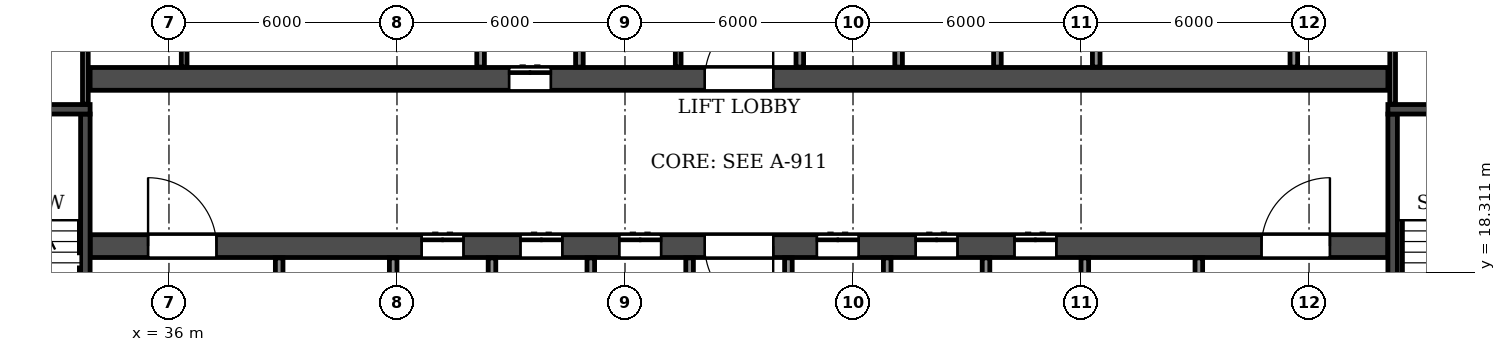
"""IFC4 building model, lengths in metres.
Left out: names, types, materials, properties, quantities, classifications, styles, units other than length and angle.
Written with IfcOpenShell. Run it as: python <this file> out.ifc"""

import sys

from ifc_helpers import new_model, si_unit, direction, frame, frame_2d, origin, place, context, subcontext, project, spatial, rectangle, extrude, element, fill, save


model = new_model("IFC4")
c1 = context("Model", 3, precision=1e-05, world=origin(), true_north=direction((0.0, 1.0)))
c2 = subcontext(c1, "Body", "Model", "MODEL_VIEW")
j1 = project(units=[si_unit("LENGTHUNIT", "METRE"), si_unit("PLANEANGLEUNIT", "RADIAN")], contexts=[c1])
p1 = place(None, origin())
s1 = spatial("IfcSite", under=j1, at=p1, CompositionType="ELEMENT")
p2 = place(p1, origin())
s2 = spatial("IfcBuilding", under=s1, at=p2, CompositionType="ELEMENT")
p3 = place(p2, frame((0.0, 0.0, 53.1)))
s3 = spatial("IfcBuildingStorey", under=s2, at=p3, CompositionType="ELEMENT", Elevation=53.1)
p4 = place(p3, frame((33.925, 19.0, 0.0), z_axis=(0.0, 0.0, 1.0), x_axis=(1.0, 0.0, 0.0)))
e1 = element("IfcWall", 1, at=p4, inside=s3, PredefinedType="SOLIDWALL", context=c2, shape_type="SweptSolid", body=[
    extrude(rectangle(XDim=34.15, YDim=0.6, at=frame_2d((17.075, 0.0))), origin(), (0.0, 0.0, 1.0), 3.05),
])
p5 = place(p4, frame((16.175, 0.0, 0.0)))
e2 = element("IfcOpeningElement", 2, at=p5, cuts=e1, PredefinedType="OPENING", context=c2, shape_type="SweptSolid", body=[
    extrude(rectangle(XDim=1.8, YDim=2.1, at=frame_2d((0.9, 1.05))), frame((0.0, 0.31, 0.0), z_axis=(0.0, -1.0, 0.0), x_axis=(1.0, 0.0, 0.0)), (0.0, 0.0, 1.0), 0.62),
])
p6 = place(p4, frame((1.525, 0.0, 0.0)))
e3 = element("IfcOpeningElement", 3, at=p6, cuts=e1, PredefinedType="OPENING", context=c2, shape_type="SweptSolid", body=[
    extrude(rectangle(XDim=1.8, YDim=2.1, at=frame_2d((0.9, 1.05))), frame((0.0, 0.31, 0.0), z_axis=(0.0, -1.0, 0.0), x_axis=(1.0, 0.0, 0.0)), (0.0, 0.0, 1.0), 0.62),
])
p7 = place(p4, frame((8.725, 0.0, 0.0)))
e4 = element("IfcOpeningElement", 4, at=p7, cuts=e1, PredefinedType="OPENING", context=c2, shape_type="SweptSolid", body=[
    extrude(rectangle(XDim=1.1, YDim=2.1, at=frame_2d((0.55, 1.05))), frame((0.0, 0.31, 0.0), z_axis=(0.0, -1.0, 0.0), x_axis=(1.0, 0.0, 0.0)), (0.0, 0.0, 1.0), 0.62),
])
p8 = place(p4, frame((11.325, 0.0, 0.0)))
e5 = element("IfcOpeningElement", 5, at=p8, cuts=e1, PredefinedType="OPENING", context=c2, shape_type="SweptSolid", body=[
    extrude(rectangle(XDim=1.1, YDim=2.1, at=frame_2d((0.55, 1.05))), frame((0.0, 0.31, 0.0), z_axis=(0.0, -1.0, 0.0), x_axis=(1.0, 0.0, 0.0)), (0.0, 0.0, 1.0), 0.62),
])
p9 = place(p4, frame((13.925, 0.0, 0.0)))
e6 = element("IfcOpeningElement", 6, at=p9, cuts=e1, PredefinedType="OPENING", context=c2, shape_type="SweptSolid", body=[
    extrude(rectangle(XDim=1.1, YDim=2.1, at=frame_2d((0.55, 1.05))), frame((0.0, 0.31, 0.0), z_axis=(0.0, -1.0, 0.0), x_axis=(1.0, 0.0, 0.0)), (0.0, 0.0, 1.0), 0.62),
])
p10 = place(p4, frame((19.125, 0.0, 0.0)))
e7 = element("IfcOpeningElement", 7, at=p10, cuts=e1, PredefinedType="OPENING", context=c2, shape_type="SweptSolid", body=[
    extrude(rectangle(XDim=1.1, YDim=2.1, at=frame_2d((0.55, 1.05))), frame((0.0, 0.31, 0.0), z_axis=(0.0, -1.0, 0.0), x_axis=(1.0, 0.0, 0.0)), (0.0, 0.0, 1.0), 0.62),
])
p11 = place(p4, frame((21.725, 0.0, 0.0)))
e8 = element("IfcOpeningElement", 8, at=p11, cuts=e1, PredefinedType="OPENING", context=c2, shape_type="SweptSolid", body=[
    extrude(rectangle(XDim=1.1, YDim=2.1, at=frame_2d((0.55, 1.05))), frame((0.0, 0.31, 0.0), z_axis=(0.0, -1.0, 0.0), x_axis=(1.0, 0.0, 0.0)), (0.0, 0.0, 1.0), 0.62),
])
p12 = place(p4, frame((24.325, 0.0, 0.0)))
e9 = element("IfcOpeningElement", 9, at=p12, cuts=e1, PredefinedType="OPENING", context=c2, shape_type="SweptSolid", body=[
    extrude(rectangle(XDim=1.1, YDim=2.1, at=frame_2d((0.55, 1.05))), frame((0.0, 0.31, 0.0), z_axis=(0.0, -1.0, 0.0), x_axis=(1.0, 0.0, 0.0)), (0.0, 0.0, 1.0), 0.62),
])
p13 = place(p4, frame((30.825, 0.0, 0.0)))
e10 = element("IfcOpeningElement", 10, at=p13, cuts=e1, PredefinedType="OPENING", context=c2, shape_type="SweptSolid", body=[
    extrude(rectangle(XDim=1.8, YDim=2.1, at=frame_2d((0.9, 1.05))), frame((0.0, 0.31, 0.0), z_axis=(0.0, -1.0, 0.0), x_axis=(1.0, 0.0, 0.0)), (0.0, 0.0, 1.0), 0.62),
])
p14 = place(p3, frame((33.925, 23.4, 0.0), z_axis=(0.0, 0.0, 1.0), x_axis=(1.0, 0.0, 0.0)))
e11 = element("IfcWall", 11, at=p14, inside=s3, PredefinedType="SOLIDWALL", context=c2, shape_type="SweptSolid", body=[
    extrude(rectangle(XDim=34.15, YDim=0.6, at=frame_2d((17.075, 0.0))), origin(), (0.0, 0.0, 1.0), 3.05),
])
p15 = place(p14, frame((16.175, 0.0, 0.0)))
e12 = element("IfcOpeningElement", 12, at=p15, cuts=e11, PredefinedType="OPENING", context=c2, shape_type="SweptSolid", body=[
    extrude(rectangle(XDim=1.8, YDim=2.1, at=frame_2d((0.9, 1.05))), frame((0.0, 0.31, 0.0), z_axis=(0.0, -1.0, 0.0), x_axis=(1.0, 0.0, 0.0)), (0.0, 0.0, 1.0), 0.62),
])
p16 = place(p14, frame((11.025, 0.0, 0.0)))
e13 = element("IfcOpeningElement", 13, at=p16, cuts=e11, PredefinedType="OPENING", context=c2, shape_type="SweptSolid", body=[
    extrude(rectangle(XDim=1.1, YDim=2.1, at=frame_2d((0.55, 1.05))), frame((0.0, 0.31, 0.0), z_axis=(0.0, -1.0, 0.0), x_axis=(1.0, 0.0, 0.0)), (0.0, 0.0, 1.0), 0.62),
])
p17 = place(p3, frame((33.8, 14.9, 0.0), z_axis=(0.0, 0.0, 1.0), x_axis=(0.0, 1.0, 0.0)))
e14 = element("IfcWall", 14, at=p17, inside=s3, PredefinedType="SOLIDWALL", context=c2, shape_type="SweptSolid", body=[
    extrude(rectangle(XDim=7.575, YDim=0.25, at=frame_2d((3.788, 0.0))), origin(), (0.0, 0.0, 1.0), 3.05),
])
p18 = place(p17, frame((0.4, 0.0, 0.0)))
e15 = element("IfcOpeningElement", 15, at=p18, cuts=e14, PredefinedType="OPENING", context=c2, shape_type="SweptSolid", body=[
    extrude(rectangle(XDim=1.0, YDim=2.1, at=frame_2d((0.5, 1.05))), frame((0.0, 0.135, 0.0), z_axis=(0.0, -1.0, 0.0), x_axis=(1.0, 0.0, 0.0)), (0.0, 0.0, 1.0), 0.27),
])
p19 = place(p3, frame((29.875, 22.6, 0.0), z_axis=(0.0, 0.0, 1.0), x_axis=(1.0, 0.0, 0.0)))
e16 = element("IfcWall", 16, at=p19, inside=s3, PredefinedType="SOLIDWALL", context=c2, shape_type="SweptSolid", body=[
    extrude(rectangle(XDim=4.05, YDim=0.25, at=frame_2d((2.025, 0.0))), origin(), (0.0, 0.0, 1.0), 3.05),
])
p20 = place(p3, frame((68.2, 14.9, 0.0), z_axis=(0.0, 0.0, 1.0), x_axis=(0.0, 1.0, 0.0)))
e17 = element("IfcWall", 17, at=p20, inside=s3, PredefinedType="SOLIDWALL", context=c2, shape_type="SweptSolid", body=[
    extrude(rectangle(XDim=7.575, YDim=0.25, at=frame_2d((3.788, 0.0))), origin(), (0.0, 0.0, 1.0), 3.05),
])
p21 = place(p20, frame((0.4, 0.0, 0.0)))
e18 = element("IfcOpeningElement", 18, at=p21, cuts=e17, PredefinedType="OPENING", context=c2, shape_type="SweptSolid", body=[
    extrude(rectangle(XDim=1.0, YDim=2.1, at=frame_2d((0.5, 1.05))), frame((0.0, 0.135, 0.0), z_axis=(0.0, -1.0, 0.0), x_axis=(1.0, 0.0, 0.0)), (0.0, 0.0, 1.0), 0.27),
])
p22 = place(p3, frame((68.075, 22.6, 0.0), z_axis=(0.0, 0.0, 1.0), x_axis=(1.0, 0.0, 0.0)))
e19 = element("IfcWall", 19, at=p22, inside=s3, PredefinedType="SOLIDWALL", context=c2, shape_type="SweptSolid", body=[
    extrude(rectangle(XDim=4.05, YDim=0.25, at=frame_2d((2.025, 0.0))), origin(), (0.0, 0.0, 1.0), 3.05),
])
for number, where, z_axis, x_axis in (
    (20, (49.4, 23.71, 0.0), (0.0, 0.0, 1.0), (0.0, 1.0, 0.0)),
    (21, (36.4, 23.71, 0.0), (0.0, 0.0, 1.0), (0.0, 1.0, 0.0)),
):
    element("IfcWall", number, at=place(p3, frame(where, z_axis=z_axis, x_axis=x_axis)), inside=s3, PredefinedType="PARTITIONING", context=c2, shape_type="SweptSolid", body=[
        extrude(rectangle(XDim=3.78, YDim=0.15, at=frame_2d((1.89, 0.0))), origin(), (0.0, 0.0, 1.0), 3.05),
    ])
p23 = place(p3, frame((65.6, 23.71, 0.0), z_axis=(0.0, 0.0, 1.0), x_axis=(0.0, 1.0, 0.0)))
e22 = element("IfcWall", 22, at=p23, inside=s3, PredefinedType="PARTITIONING", context=c2, shape_type="SweptSolid", body=[
    extrude(rectangle(XDim=3.78, YDim=0.2, at=frame_2d((1.89, 0.0))), origin(), (0.0, 0.0, 1.0), 3.05),
])
for number, where, z_axis, x_axis in (
    (23, (33.8, 22.735, 0.0), (0.0, 0.0, 1.0), (0.0, 1.0, 0.0)),
    (24, (68.2, 22.735, 0.0), (0.0, 0.0, 1.0), (0.0, 1.0, 0.0)),
):
    element("IfcWall", number, at=place(p3, frame(where, z_axis=z_axis, x_axis=x_axis)), inside=s3, PredefinedType="PARTITIONING", context=c2, shape_type="SweptSolid", body=[
        extrude(rectangle(XDim=4.755, YDim=0.15, at=frame_2d((2.377, 0.0))), origin(), (0.0, 0.0, 1.0), 3.05),
    ])
p24 = place(p3, frame((38.9, 14.91, 0.0), z_axis=(0.0, 0.0, 1.0), x_axis=(0.0, 1.0, 0.0)))
e25 = element("IfcWall", 25, at=p24, inside=s3, PredefinedType="PARTITIONING", context=c2, shape_type="SweptSolid", body=[
    extrude(rectangle(XDim=3.78, YDim=0.2, at=frame_2d((1.89, 0.0))), origin(), (0.0, 0.0, 1.0), 3.05),
])
p25 = place(p24, frame((1.34, 0.0, 0.0)))
e26 = element("IfcOpeningElement", 26, at=p25, cuts=e25, PredefinedType="OPENING", context=c2, shape_type="SweptSolid", body=[
    extrude(rectangle(XDim=1.1, YDim=2.1, at=frame_2d((0.55, 1.05))), frame((0.0, 0.11, 0.0), z_axis=(0.0, -1.0, 0.0), x_axis=(1.0, 0.0, 0.0)), (0.0, 0.0, 1.0), 0.22),
])
for number, where, z_axis, x_axis in (
    (27, (41.9, 14.91, 0.0), (0.0, 0.0, 1.0), (0.0, 1.0, 0.0)),
    (28, (44.2, 23.71, 0.0), (0.0, 0.0, 1.0), (0.0, 1.0, 0.0)),
):
    element("IfcWall", number, at=place(p3, frame(where, z_axis=z_axis, x_axis=x_axis)), inside=s3, PredefinedType="PARTITIONING", context=c2, shape_type="SweptSolid", body=[
        extrude(rectangle(XDim=3.78, YDim=0.2, at=frame_2d((1.89, 0.0))), origin(), (0.0, 0.0, 1.0), 3.05),
    ])
p26 = place(p3, frame((44.5, 16.3, 0.0), z_axis=(0.0, 0.0, 1.0), x_axis=(0.0, 1.0, 0.0)))
e29 = element("IfcWall", 29, at=p26, inside=s3, PredefinedType="PARTITIONING", context=c2, shape_type="SweptSolid", body=[
    extrude(rectangle(XDim=2.39, YDim=0.2, at=frame_2d((1.195, 0.0))), origin(), (0.0, 0.0, 1.0), 3.05),
])
p27 = place(p3, frame((46.8, 23.71, 0.0), z_axis=(0.0, 0.0, 1.0), x_axis=(0.0, 1.0, 0.0)))
e30 = element("IfcWall", 30, at=p27, inside=s3, PredefinedType="PARTITIONING", context=c2, shape_type="SweptSolid", body=[
    extrude(rectangle(XDim=3.78, YDim=0.2, at=frame_2d((1.89, 0.0))), origin(), (0.0, 0.0, 1.0), 3.05),
])
for number, where, z_axis, x_axis in (
    (31, (47.1, 16.3, 0.0), (0.0, 0.0, 1.0), (0.0, 1.0, 0.0)),
    (32, (49.7, 16.3, 0.0), (0.0, 0.0, 1.0), (0.0, 1.0, 0.0)),
    (33, (52.3, 16.3, 0.0), (0.0, 0.0, 1.0), (0.0, 1.0, 0.0)),
):
    element("IfcWall", number, at=place(p3, frame(where, z_axis=z_axis, x_axis=x_axis)), inside=s3, PredefinedType="PARTITIONING", context=c2, shape_type="SweptSolid", body=[
        extrude(rectangle(XDim=2.39, YDim=0.2, at=frame_2d((1.195, 0.0))), origin(), (0.0, 0.0, 1.0), 3.05),
    ])
p28 = place(p3, frame((52.6, 23.71, 0.0), z_axis=(0.0, 0.0, 1.0), x_axis=(0.0, 1.0, 0.0)))
e34 = element("IfcWall", 34, at=p28, inside=s3, PredefinedType="PARTITIONING", context=c2, shape_type="SweptSolid", body=[
    extrude(rectangle(XDim=2.39, YDim=0.2, at=frame_2d((1.195, 0.0))), origin(), (0.0, 0.0, 1.0), 3.05),
])
p29 = place(p3, frame((54.9, 16.3, 0.0), z_axis=(0.0, 0.0, 1.0), x_axis=(0.0, 1.0, 0.0)))
e35 = element("IfcWall", 35, at=p29, inside=s3, PredefinedType="PARTITIONING", context=c2, shape_type="SweptSolid", body=[
    extrude(rectangle(XDim=2.39, YDim=0.2, at=frame_2d((1.195, 0.0))), origin(), (0.0, 0.0, 1.0), 3.05),
])
p30 = place(p3, frame((55.2, 23.71, 0.0), z_axis=(0.0, 0.0, 1.0), x_axis=(0.0, 1.0, 0.0)))
e36 = element("IfcWall", 36, at=p30, inside=s3, PredefinedType="PARTITIONING", context=c2, shape_type="SweptSolid", body=[
    extrude(rectangle(XDim=2.39, YDim=0.2, at=frame_2d((1.195, 0.0))), origin(), (0.0, 0.0, 1.0), 3.05),
])
p31 = place(p3, frame((57.5, 16.3, 0.0), z_axis=(0.0, 0.0, 1.0), x_axis=(0.0, 1.0, 0.0)))
e37 = element("IfcWall", 37, at=p31, inside=s3, PredefinedType="PARTITIONING", context=c2, shape_type="SweptSolid", body=[
    extrude(rectangle(XDim=2.39, YDim=0.2, at=frame_2d((1.195, 0.0))), origin(), (0.0, 0.0, 1.0), 3.05),
])
p32 = place(p3, frame((57.8, 23.71, 0.0), z_axis=(0.0, 0.0, 1.0), x_axis=(0.0, 1.0, 0.0)))
e38 = element("IfcWall", 38, at=p32, inside=s3, PredefinedType="PARTITIONING", context=c2, shape_type="SweptSolid", body=[
    extrude(rectangle(XDim=2.39, YDim=0.2, at=frame_2d((1.195, 0.0))), origin(), (0.0, 0.0, 1.0), 3.05),
])
p33 = place(p3, frame((60.1, 14.91, 0.0), z_axis=(0.0, 0.0, 1.0), x_axis=(0.0, 1.0, 0.0)))
e39 = element("IfcWall", 39, at=p33, inside=s3, PredefinedType="PARTITIONING", context=c2, shape_type="SweptSolid", body=[
    extrude(rectangle(XDim=3.78, YDim=0.2, at=frame_2d((1.89, 0.0))), origin(), (0.0, 0.0, 1.0), 3.05),
])
p34 = place(p3, frame((60.4, 23.71, 0.0), z_axis=(0.0, 0.0, 1.0), x_axis=(0.0, 1.0, 0.0)))
e40 = element("IfcWall", 40, at=p34, inside=s3, PredefinedType="PARTITIONING", context=c2, shape_type="SweptSolid", body=[
    extrude(rectangle(XDim=2.39, YDim=0.2, at=frame_2d((1.195, 0.0))), origin(), (0.0, 0.0, 1.0), 3.05),
])
p35 = place(p3, frame((63.1, 14.91, 0.0), z_axis=(0.0, 0.0, 1.0), x_axis=(0.0, 1.0, 0.0)))
e41 = element("IfcWall", 41, at=p35, inside=s3, PredefinedType="PARTITIONING", context=c2, shape_type="SweptSolid", body=[
    extrude(rectangle(XDim=3.78, YDim=0.2, at=frame_2d((1.89, 0.0))), origin(), (0.0, 0.0, 1.0), 3.05),
])
p36 = place(p35, frame((1.34, 0.0, 0.0)))
e42 = element("IfcOpeningElement", 42, at=p36, cuts=e41, PredefinedType="OPENING", context=c2, shape_type="SweptSolid", body=[
    extrude(rectangle(XDim=1.1, YDim=2.1, at=frame_2d((0.55, 1.05))), frame((0.0, 0.11, 0.0), z_axis=(0.0, -1.0, 0.0), x_axis=(1.0, 0.0, 0.0)), (0.0, 0.0, 1.0), 0.22),
])
p37 = place(p15, origin())
e43 = element("IfcDoor", 43, at=p37, inside=s3, OperationType="DOUBLE_DOOR_SINGLE_SWING", PredefinedType="DOOR", context=c2, shape_type="SweptSolid", body=[
    extrude(rectangle(XDim=1.8, YDim=2.1, at=frame_2d((0.9, 1.05))), frame((0.0, 0.025, 0.0), z_axis=(0.0, -1.0, 0.0), x_axis=(1.0, 0.0, 0.0)), (0.0, 0.0, 1.0), 0.05),
])
fill(e12, e43)
p38 = place(p5, frame((1.8, 0.0, 0.0), z_axis=(0.0, 0.0, 1.0), x_axis=(-1.0, 0.0, 0.0)))
e44 = element("IfcDoor", 44, at=p38, inside=s3, OperationType="DOUBLE_DOOR_SINGLE_SWING", PredefinedType="DOOR", context=c2, shape_type="SweptSolid", body=[
    extrude(rectangle(XDim=1.8, YDim=2.1, at=frame_2d((0.9, 1.05))), frame((0.0, 0.025, 0.0), z_axis=(0.0, -1.0, 0.0), x_axis=(1.0, 0.0, 0.0)), (0.0, 0.0, 1.0), 0.05),
])
fill(e2, e44)
p39 = place(p6, origin())
e45 = element("IfcDoor", 45, at=p39, inside=s3, OperationType="DOUBLE_DOOR_SINGLE_SWING", PredefinedType="DOOR", context=c2, shape_type="SweptSolid", body=[
    extrude(rectangle(XDim=1.8, YDim=2.1, at=frame_2d((0.9, 1.05))), frame((0.0, 0.025, 0.0), z_axis=(0.0, -1.0, 0.0), x_axis=(1.0, 0.0, 0.0)), (0.0, 0.0, 1.0), 0.05),
])
fill(e3, e45)
p40 = place(p7, origin())
e46 = element("IfcDoor", 46, at=p40, inside=s3, OperationType="DOUBLE_DOOR_SLIDING", PredefinedType="DOOR", context=c2, shape_type="SweptSolid", body=[
    extrude(rectangle(XDim=1.1, YDim=2.1, at=frame_2d((0.55, 1.05))), frame((0.0, 0.025, 0.0), z_axis=(0.0, -1.0, 0.0), x_axis=(1.0, 0.0, 0.0)), (0.0, 0.0, 1.0), 0.05),
])
fill(e4, e46)
p41 = place(p16, origin())
e47 = element("IfcDoor", 47, at=p41, inside=s3, OperationType="DOUBLE_DOOR_SLIDING", PredefinedType="DOOR", context=c2, shape_type="SweptSolid", body=[
    extrude(rectangle(XDim=1.1, YDim=2.1, at=frame_2d((0.55, 1.05))), frame((0.0, 0.025, 0.0), z_axis=(0.0, -1.0, 0.0), x_axis=(1.0, 0.0, 0.0)), (0.0, 0.0, 1.0), 0.05),
])
fill(e13, e47)
p42 = place(p8, origin())
e48 = element("IfcDoor", 48, at=p42, inside=s3, OperationType="DOUBLE_DOOR_SLIDING", PredefinedType="DOOR", context=c2, shape_type="SweptSolid", body=[
    extrude(rectangle(XDim=1.1, YDim=2.1, at=frame_2d((0.55, 1.05))), frame((0.0, 0.025, 0.0), z_axis=(0.0, -1.0, 0.0), x_axis=(1.0, 0.0, 0.0)), (0.0, 0.0, 1.0), 0.05),
])
fill(e5, e48)
p43 = place(p9, origin())
e49 = element("IfcDoor", 49, at=p43, inside=s3, OperationType="DOUBLE_DOOR_SLIDING", PredefinedType="DOOR", context=c2, shape_type="SweptSolid", body=[
    extrude(rectangle(XDim=1.1, YDim=2.1, at=frame_2d((0.55, 1.05))), frame((0.0, 0.025, 0.0), z_axis=(0.0, -1.0, 0.0), x_axis=(1.0, 0.0, 0.0)), (0.0, 0.0, 1.0), 0.05),
])
fill(e6, e49)
p44 = place(p10, origin())
e50 = element("IfcDoor", 50, at=p44, inside=s3, OperationType="DOUBLE_DOOR_SLIDING", PredefinedType="DOOR", context=c2, shape_type="SweptSolid", body=[
    extrude(rectangle(XDim=1.1, YDim=2.1, at=frame_2d((0.55, 1.05))), frame((0.0, 0.025, 0.0), z_axis=(0.0, -1.0, 0.0), x_axis=(1.0, 0.0, 0.0)), (0.0, 0.0, 1.0), 0.05),
])
fill(e7, e50)
p45 = place(p11, origin())
e51 = element("IfcDoor", 51, at=p45, inside=s3, OperationType="DOUBLE_DOOR_SLIDING", PredefinedType="DOOR", context=c2, shape_type="SweptSolid", body=[
    extrude(rectangle(XDim=1.1, YDim=2.1, at=frame_2d((0.55, 1.05))), frame((0.0, 0.025, 0.0), z_axis=(0.0, -1.0, 0.0), x_axis=(1.0, 0.0, 0.0)), (0.0, 0.0, 1.0), 0.05),
])
fill(e8, e51)
p46 = place(p12, origin())
e52 = element("IfcDoor", 52, at=p46, inside=s3, OperationType="DOUBLE_DOOR_SLIDING", PredefinedType="DOOR", context=c2, shape_type="SweptSolid", body=[
    extrude(rectangle(XDim=1.1, YDim=2.1, at=frame_2d((0.55, 1.05))), frame((0.0, 0.025, 0.0), z_axis=(0.0, -1.0, 0.0), x_axis=(1.0, 0.0, 0.0)), (0.0, 0.0, 1.0), 0.05),
])
fill(e9, e52)
p47 = place(p13, origin())
e53 = element("IfcDoor", 53, at=p47, inside=s3, OperationType="DOUBLE_DOOR_SINGLE_SWING", PredefinedType="DOOR", context=c2, shape_type="SweptSolid", body=[
    extrude(rectangle(XDim=1.8, YDim=2.1, at=frame_2d((0.9, 1.05))), frame((0.0, 0.025, 0.0), z_axis=(0.0, -1.0, 0.0), x_axis=(1.0, 0.0, 0.0)), (0.0, 0.0, 1.0), 0.05),
])
fill(e10, e53)
save(model, sys.argv[1])
